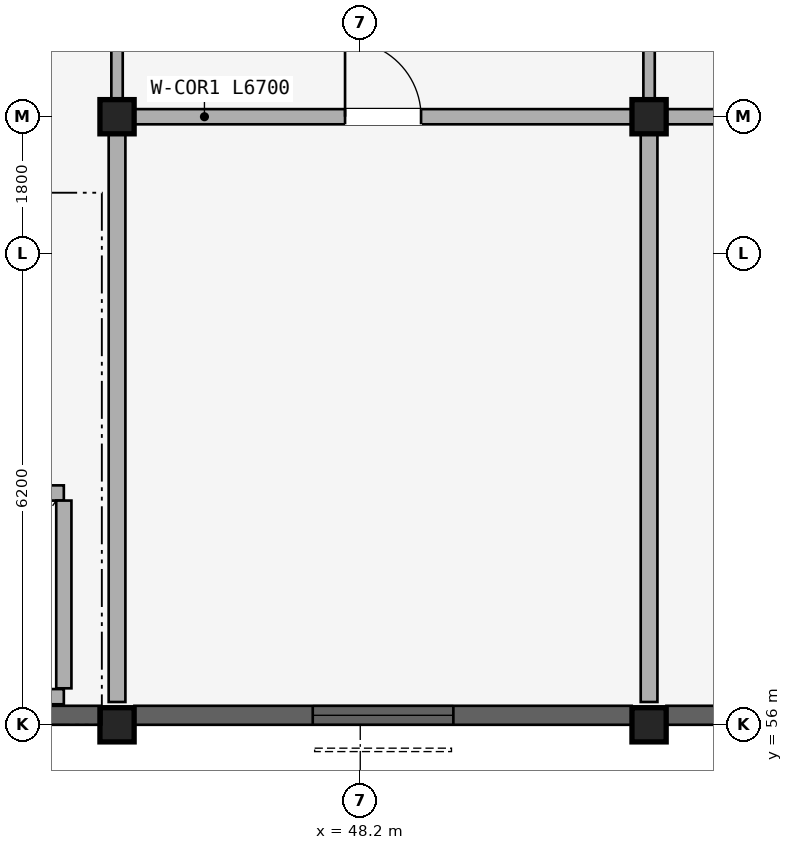
"""IFC4 building model, lengths in metres.
Left out: names, types, materials, properties, quantities, classifications, styles, units other than length and angle.
Written with IfcOpenShell. Run it as: python <this file> out.ifc"""

import sys

from ifc_helpers import new_model, si_unit, direction, frame, frame_2d, origin, origin_2d, place, context, subcontext, project, spatial, rectangle, extrude, element, fill, save


model = new_model("IFC4")
c1 = context("Model", 3, precision=1e-05, world=origin(), true_north=direction((0.0, 1.0)))
c2 = subcontext(c1, "Body", "Model", "MODEL_VIEW")
j1 = project(units=[si_unit("LENGTHUNIT", "METRE"), si_unit("PLANEANGLEUNIT", "RADIAN")], contexts=[c1])
p1 = place(None, origin())
s1 = spatial("IfcSite", under=j1, at=p1, CompositionType="ELEMENT")
p2 = place(p1, origin())
s2 = spatial("IfcBuilding", under=s1, at=p2, CompositionType="ELEMENT")
p3 = place(p2, frame((0.0, 0.0, 4.5)))
s3 = spatial("IfcBuildingStorey", under=s2, at=p3, CompositionType="ELEMENT", Elevation=4.5)
p4 = place(p3, frame((45.0, 56.0, 0.0), z_axis=(0.0, 0.0, 1.0), x_axis=(1.0, 0.0, 0.0)))
e1 = element("IfcColumn", 1, at=p4, inside=s3, PredefinedType="COLUMN", context=c2, shape_type="SweptSolid", body=[
    extrude(rectangle(XDim=0.45, YDim=0.45, at=origin_2d()), origin(), (0.0, 0.0, 1.0), 4.85),
])
p5 = place(p3, frame((45.0, 64.0, 0.0), z_axis=(0.0, 0.0, 1.0), x_axis=(1.0, 0.0, 0.0)))
e2 = element("IfcColumn", 2, at=p5, inside=s3, PredefinedType="COLUMN", context=c2, shape_type="SweptSolid", body=[
    extrude(rectangle(XDim=0.45, YDim=0.45, at=origin_2d()), origin(), (0.0, 0.0, 1.0), 4.0),
])
p6 = place(p3, frame((52.0, 56.0, 0.0), z_axis=(0.0, 0.0, 1.0), x_axis=(1.0, 0.0, 0.0)))
e3 = element("IfcColumn", 3, at=p6, inside=s3, PredefinedType="COLUMN", context=c2, shape_type="SweptSolid", body=[
    extrude(rectangle(XDim=0.45, YDim=0.45, at=origin_2d()), origin(), (0.0, 0.0, 1.0), 4.85),
])
p7 = place(p3, frame((52.0, 64.0, 0.0), z_axis=(0.0, 0.0, 1.0), x_axis=(1.0, 0.0, 0.0)))
e4 = element("IfcColumn", 4, at=p7, inside=s3, PredefinedType="COLUMN", context=c2, shape_type="SweptSolid", body=[
    extrude(rectangle(XDim=0.45, YDim=0.45, at=origin_2d()), origin(), (0.0, 0.0, 1.0), 4.0),
])
p8 = place(p3, frame((42.3, 59.05, 0.0), z_axis=(0.0, 0.0, 1.0), x_axis=(1.0, 0.0, 0.0)))
e5 = element("IfcWall", 5, at=p8, inside=s3, PredefinedType="STANDARD", context=c2, shape_type="SweptSolid", body=[
    extrude(rectangle(XDim=2.0, YDim=0.2, at=frame_2d((1.0, 0.0))), origin(), (0.0, 0.0, 1.0), 3.95),
])
p9 = place(p8, frame((0.49, 0.0, 0.0)))
e6 = element("IfcOpeningElement", 6, at=p9, cuts=e5, PredefinedType="OPENING", context=c2, shape_type="SweptSolid", body=[
    extrude(rectangle(XDim=1.02, YDim=2.15, at=frame_2d((0.51, 1.075))), frame((0.0, 0.11, 0.0), z_axis=(0.0, -1.0, 0.0), x_axis=(1.0, 0.0, 0.0)), (0.0, 0.0, 1.0), 0.22),
])
p10 = place(p3, frame((42.3, 56.37, 0.0), z_axis=(0.0, 0.0, 1.0), x_axis=(1.0, 0.0, 0.0)))
e7 = element("IfcWall", 7, at=p10, inside=s3, PredefinedType="STANDARD", context=c2, shape_type="SweptSolid", body=[
    extrude(rectangle(XDim=2.0, YDim=0.2, at=frame_2d((1.0, 0.0))), origin(), (0.0, 0.0, 1.0), 3.95),
])
p11 = place(p3, frame((44.3, 56.48, 0.0), z_axis=(0.0, 0.0, 1.0), x_axis=(0.0, 1.0, 0.0)))
e8 = element("IfcWall", 8, at=p11, inside=s3, PredefinedType="STANDARD", context=c2, shape_type="SweptSolid", body=[
    extrude(rectangle(XDim=2.47, YDim=0.2, at=frame_2d((1.235, 0.0))), origin(), (0.0, 0.0, 1.0), 3.95),
])
p12 = place(p3, frame((45.15, 64.0, 0.0), z_axis=(0.0, 0.0, 1.0), x_axis=(1.0, 0.0, 0.0)))
e9 = element("IfcWall", 9, at=p12, inside=s3, PredefinedType="STANDARD", context=c2, shape_type="SweptSolid", body=[
    extrude(rectangle(XDim=6.7, YDim=0.2, at=frame_2d((3.35, 0.0))), origin(), (0.0, 0.0, 1.0), 2.792),
])
p13 = place(p12, frame((2.85, 0.0, 0.0)))
e10 = element("IfcOpeningElement", 10, at=p13, cuts=e9, PredefinedType="OPENING", context=c2, shape_type="SweptSolid", body=[
    extrude(rectangle(XDim=1.0, YDim=2.15, at=frame_2d((0.5, 1.075))), frame((0.0, 0.11, 0.0), z_axis=(0.0, -1.0, 0.0), x_axis=(1.0, 0.0, 0.0)), (0.0, 0.0, 1.0), 0.22),
])
p14 = place(p3, frame((52.15, 64.0, 0.0), z_axis=(0.0, 0.0, 1.0), x_axis=(1.0, 0.0, 0.0)))
e11 = element("IfcWall", 11, at=p14, inside=s3, PredefinedType="STANDARD", context=c2, shape_type="SweptSolid", body=[
    extrude(rectangle(XDim=6.7, YDim=0.2, at=frame_2d((3.35, 0.0))), origin(), (0.0, 0.0, 1.0), 2.792),
])
p15 = place(p14, frame((2.85, 0.0, 0.0)))
e12 = element("IfcOpeningElement", 12, at=p15, cuts=e11, PredefinedType="OPENING", context=c2, shape_type="SweptSolid", body=[
    extrude(rectangle(XDim=1.0, YDim=2.15, at=frame_2d((0.5, 1.075))), frame((0.0, 0.11, 0.0), z_axis=(0.0, -1.0, 0.0), x_axis=(1.0, 0.0, 0.0)), (0.0, 0.0, 1.0), 0.22),
])
p16 = place(p3, frame((45.0, 56.3, 0.0), z_axis=(0.0, 0.0, 1.0), x_axis=(0.0, 1.0, 0.0)))
e13 = element("IfcWall", 13, at=p16, inside=s3, PredefinedType="STANDARD", context=c2, shape_type="SweptSolid", body=[
    extrude(rectangle(XDim=7.6, YDim=0.22, at=frame_2d((3.8, 0.0))), origin(), (0.0, 0.0, 1.0), 3.442),
])
p17 = place(p3, frame((45.0, 64.1, 0.0), z_axis=(0.0, 0.0, 1.0), x_axis=(0.0, 1.0, 0.0)))
e14 = element("IfcWall", 14, at=p17, inside=s3, PredefinedType="PARTITIONING", context=c2, shape_type="SweptSolid", body=[
    extrude(rectangle(XDim=7.8, YDim=0.15, at=frame_2d((3.9, 0.0))), origin(), (0.0, 0.0, 1.0), 2.792),
])
p18 = place(p17, frame((3.0, 0.0, 0.0)))
e15 = element("IfcOpeningElement", 15, at=p18, cuts=e14, PredefinedType="OPENING", context=c2, shape_type="SweptSolid", body=[
    extrude(rectangle(XDim=1.8, YDim=2.2, at=frame_2d((0.9, 1.1))), frame((0.0, 0.085, 0.0), z_axis=(0.0, -1.0, 0.0), x_axis=(1.0, 0.0, 0.0)), (0.0, 0.0, 1.0), 0.17),
])
p19 = place(p3, frame((52.0, 56.3, 0.0), z_axis=(0.0, 0.0, 1.0), x_axis=(0.0, 1.0, 0.0)))
e16 = element("IfcWall", 16, at=p19, inside=s3, PredefinedType="STANDARD", context=c2, shape_type="SweptSolid", body=[
    extrude(rectangle(XDim=7.6, YDim=0.22, at=frame_2d((3.8, 0.0))), origin(), (0.0, 0.0, 1.0), 3.442),
])
p20 = place(p3, frame((52.0, 64.1, 0.0), z_axis=(0.0, 0.0, 1.0), x_axis=(0.0, 1.0, 0.0)))
e17 = element("IfcWall", 17, at=p20, inside=s3, PredefinedType="PARTITIONING", context=c2, shape_type="SweptSolid", body=[
    extrude(rectangle(XDim=7.8, YDim=0.15, at=frame_2d((3.9, 0.0))), origin(), (0.0, 0.0, 1.0), 2.792),
])
p21 = place(p20, frame((3.0, 0.0, 0.0)))
e18 = element("IfcOpeningElement", 18, at=p21, cuts=e17, PredefinedType="OPENING", context=c2, shape_type="SweptSolid", body=[
    extrude(rectangle(XDim=1.8, YDim=2.2, at=frame_2d((0.9, 1.1))), frame((0.0, 0.085, 0.0), z_axis=(0.0, -1.0, 0.0), x_axis=(1.0, 0.0, 0.0)), (0.0, 0.0, 1.0), 0.17),
])
p22 = place(p3, frame((38.0, 56.125, 0.0), z_axis=(0.0, 0.0, 1.0), x_axis=(1.0, 0.0, 0.0)))
e19 = element("IfcWall", 19, at=p22, inside=s3, PredefinedType="STANDARD", context=c2, shape_type="SweptSolid", body=[
    extrude(rectangle(XDim=6.771, YDim=0.25, at=frame_2d((3.386, 0.0))), origin(), (0.0, 0.0, 1.0), 3.442),
])
p23 = place(p22, frame((4.9, 0.0, 0.88)))
e20 = element("IfcOpeningElement", 20, at=p23, cuts=e19, PredefinedType="OPENING", context=c2, shape_type="SweptSolid", body=[
    extrude(rectangle(XDim=1.2, YDim=1.5, at=frame_2d((0.6, 0.75))), frame((0.0, 0.135, 0.0), z_axis=(0.0, -1.0, 0.0), x_axis=(1.0, 0.0, 0.0)), (0.0, 0.0, 1.0), 0.27),
])
p24 = place(p3, frame((45.229, 56.125, 0.0), z_axis=(0.0, 0.0, 1.0), x_axis=(1.0, 0.0, 0.0)))
e21 = element("IfcWall", 21, at=p24, inside=s3, PredefinedType="STANDARD", context=c2, shape_type="SweptSolid", body=[
    extrude(rectangle(XDim=6.543, YDim=0.25, at=frame_2d((3.271, 0.0))), origin(), (0.0, 0.0, 1.0), 3.442),
])
p25 = place(p24, frame((2.346, 0.0, 0.88)))
e22 = element("IfcOpeningElement", 22, at=p25, cuts=e21, PredefinedType="OPENING", context=c2, shape_type="SweptSolid", body=[
    extrude(rectangle(XDim=1.85, YDim=1.9, at=frame_2d((0.925, 0.95))), frame((0.0, 0.135, 0.0), z_axis=(0.0, -1.0, 0.0), x_axis=(1.0, 0.0, 0.0)), (0.0, 0.0, 1.0), 0.27),
])
p26 = place(p3, frame((52.229, 56.125, 0.0), z_axis=(0.0, 0.0, 1.0), x_axis=(1.0, 0.0, 0.0)))
e23 = element("IfcWall", 23, at=p26, inside=s3, PredefinedType="STANDARD", context=c2, shape_type="SweptSolid", body=[
    extrude(rectangle(XDim=6.543, YDim=0.25, at=frame_2d((3.271, 0.0))), origin(), (0.0, 0.0, 1.0), 3.442),
])
p27 = place(p26, frame((2.346, 0.0, 0.88)))
e24 = element("IfcOpeningElement", 24, at=p27, cuts=e23, PredefinedType="OPENING", context=c2, shape_type="SweptSolid", body=[
    extrude(rectangle(XDim=1.85, YDim=1.9, at=frame_2d((0.925, 0.95))), frame((0.0, 0.135, 0.0), z_axis=(0.0, -1.0, 0.0), x_axis=(1.0, 0.0, 0.0)), (0.0, 0.0, 1.0), 0.27),
])
p28 = place(p25, origin())
e25 = element("IfcWindow", 25, at=p28, inside=s3, PartitioningType="DOUBLE_PANEL_VERTICAL", PredefinedType="WINDOW", context=c2, shape_type="SweptSolid", body=[
    extrude(rectangle(XDim=1.85, YDim=1.9, at=frame_2d((0.925, 0.95))), frame((0.0, 0.03, 0.0), z_axis=(0.0, -1.0, 0.0), x_axis=(1.0, 0.0, 0.0)), (0.0, 0.0, 1.0), 0.06),
])
fill(e22, e25)
p29 = place(p13, frame((1.0, 0.0, 0.0), z_axis=(0.0, 0.0, 1.0), x_axis=(-1.0, 0.0, 0.0)))
e26 = element("IfcDoor", 26, at=p29, inside=s3, OperationType="SINGLE_SWING_RIGHT", PredefinedType="DOOR", context=c2, shape_type="SweptSolid", body=[
    extrude(rectangle(XDim=1.0, YDim=2.15, at=frame_2d((0.5, 1.075))), frame((0.0, 0.025, 0.0), z_axis=(0.0, -1.0, 0.0), x_axis=(1.0, 0.0, 0.0)), (0.0, 0.0, 1.0), 0.05),
])
fill(e10, e26)
save(model, sys.argv[1])
